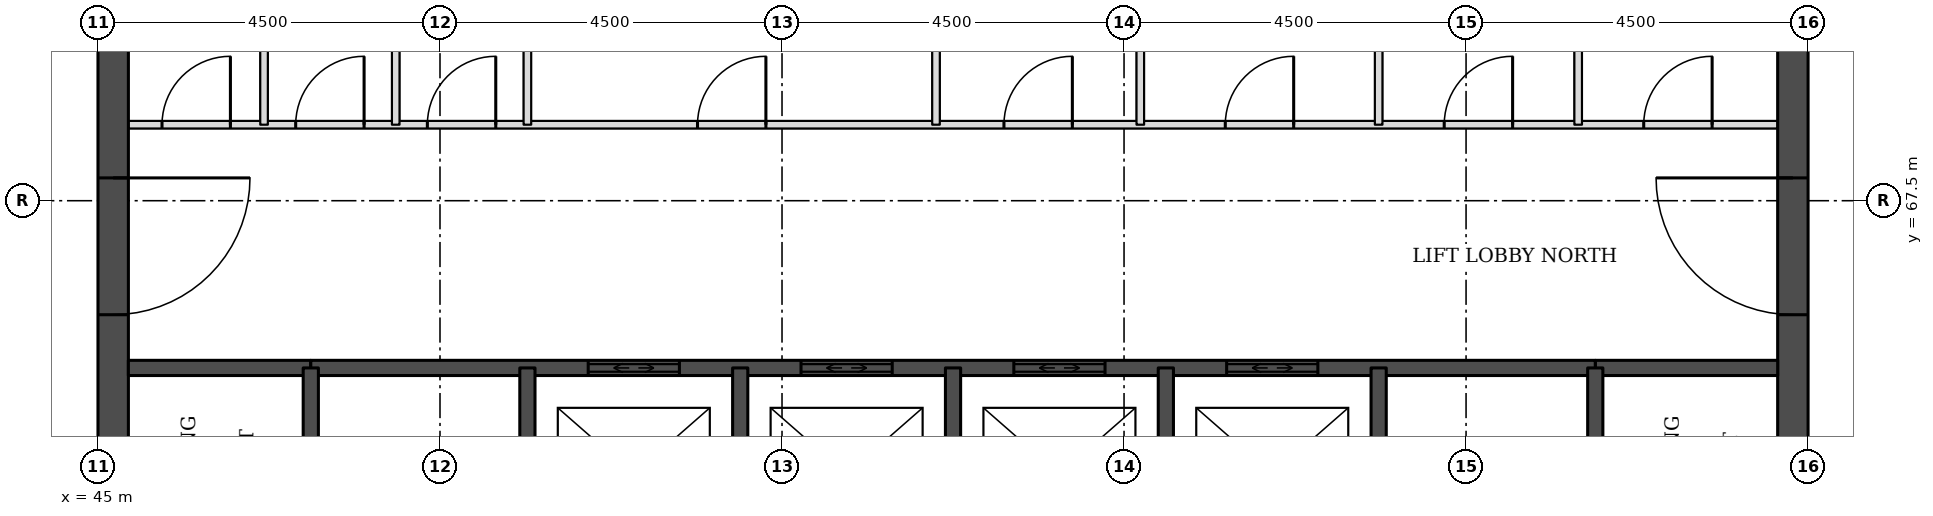
"""IFC4 building model, lengths in metres.
Left out: names, types, materials, properties, quantities, classifications, styles, units other than length and angle.
Written with IfcOpenShell. Run it as: python <this file> out.ifc"""

import sys

from ifc_helpers import new_model, si_unit, direction, frame, frame_2d, origin, place, context, subcontext, project, spatial, rectangle, extrude, element, fill, save


model = new_model("IFC4")
c1 = context("Model", 3, precision=1e-05, world=origin(), true_north=direction((0.0, 1.0)))
c2 = subcontext(c1, "Body", "Model", "MODEL_VIEW")
j1 = project(units=[si_unit("LENGTHUNIT", "METRE"), si_unit("PLANEANGLEUNIT", "RADIAN")], contexts=[c1])
p1 = place(None, origin())
s1 = spatial("IfcSite", under=j1, at=p1, CompositionType="ELEMENT")
p2 = place(p1, origin())
s2 = spatial("IfcBuilding", under=s1, at=p2, CompositionType="ELEMENT")
p3 = place(p2, frame((0.0, 0.0, 184.7)))
s3 = spatial("IfcBuildingStorey", under=s2, at=p3, CompositionType="ELEMENT", Elevation=184.7)
p4 = place(p3, frame((45.2, 49.5, 0.0), z_axis=(0.0, 0.0, 1.0), x_axis=(0.0, 1.0, 0.0)))
e1 = element("IfcWall", 1, at=p4, inside=s3, PredefinedType="SHEAR", context=c2, shape_type="SweptSolid", body=[
    extrude(rectangle(XDim=22.5, YDim=0.4, at=frame_2d((11.25, 0.0))), origin(), (0.0, 0.0, 1.0), 3.7),
])
p5 = place(p4, frame((4.2, 0.0, 0.0)))
e2 = element("IfcOpeningElement", 2, at=p5, cuts=e1, PredefinedType="OPENING", context=c2, shape_type="SweptSolid", body=[
    extrude(rectangle(XDim=1.8, YDim=2.1, at=frame_2d((0.9, 1.05))), frame((0.0, 0.21, 0.0), z_axis=(0.0, -1.0, 0.0), x_axis=(1.0, 0.0, 0.0)), (0.0, 0.0, 1.0), 0.42),
])
p6 = place(p4, frame((6.9, 0.0, 0.0)))
e3 = element("IfcOpeningElement", 3, at=p6, cuts=e1, PredefinedType="OPENING", context=c2, shape_type="SweptSolid", body=[
    extrude(rectangle(XDim=1.1, YDim=2.1, at=frame_2d((0.55, 1.05))), frame((0.0, 0.21, 0.0), z_axis=(0.0, -1.0, 0.0), x_axis=(1.0, 0.0, 0.0)), (0.0, 0.0, 1.0), 0.42),
])
p7 = place(p4, frame((13.6, 0.0, 0.0)))
e4 = element("IfcOpeningElement", 4, at=p7, cuts=e1, PredefinedType="OPENING", context=c2, shape_type="SweptSolid", body=[
    extrude(rectangle(XDim=1.1, YDim=2.1, at=frame_2d((0.55, 1.05))), frame((0.0, 0.21, 0.0), z_axis=(0.0, -1.0, 0.0), x_axis=(1.0, 0.0, 0.0)), (0.0, 0.0, 1.0), 0.42),
])
p8 = place(p4, frame((16.5, 0.0, 0.0)))
e5 = element("IfcOpeningElement", 5, at=p8, cuts=e1, PredefinedType="OPENING", context=c2, shape_type="SweptSolid", body=[
    extrude(rectangle(XDim=1.8, YDim=2.1, at=frame_2d((0.9, 1.05))), frame((0.0, 0.21, 0.0), z_axis=(0.0, -1.0, 0.0), x_axis=(1.0, 0.0, 0.0)), (0.0, 0.0, 1.0), 0.42),
])
p9 = place(p3, frame((67.3, 49.5, 0.0), z_axis=(0.0, 0.0, 1.0), x_axis=(0.0, 1.0, 0.0)))
e6 = element("IfcWall", 6, at=p9, inside=s3, PredefinedType="SHEAR", context=c2, shape_type="SweptSolid", body=[
    extrude(rectangle(XDim=22.5, YDim=0.4, at=frame_2d((11.25, 0.0))), origin(), (0.0, 0.0, 1.0), 3.7),
])
p10 = place(p9, frame((4.2, 0.0, 0.0)))
e7 = element("IfcOpeningElement", 7, at=p10, cuts=e6, PredefinedType="OPENING", context=c2, shape_type="SweptSolid", body=[
    extrude(rectangle(XDim=1.8, YDim=2.1, at=frame_2d((0.9, 1.05))), frame((0.0, 0.21, 0.0), z_axis=(0.0, -1.0, 0.0), x_axis=(1.0, 0.0, 0.0)), (0.0, 0.0, 1.0), 0.42),
])
p11 = place(p9, frame((6.9, 0.0, 0.0)))
e8 = element("IfcOpeningElement", 8, at=p11, cuts=e6, PredefinedType="OPENING", context=c2, shape_type="SweptSolid", body=[
    extrude(rectangle(XDim=1.1, YDim=2.1, at=frame_2d((0.55, 1.05))), frame((0.0, 0.21, 0.0), z_axis=(0.0, -1.0, 0.0), x_axis=(1.0, 0.0, 0.0)), (0.0, 0.0, 1.0), 0.42),
])
p12 = place(p9, frame((13.6, 0.0, 0.0)))
e9 = element("IfcOpeningElement", 9, at=p12, cuts=e6, PredefinedType="OPENING", context=c2, shape_type="SweptSolid", body=[
    extrude(rectangle(XDim=1.1, YDim=2.1, at=frame_2d((0.55, 1.05))), frame((0.0, 0.21, 0.0), z_axis=(0.0, -1.0, 0.0), x_axis=(1.0, 0.0, 0.0)), (0.0, 0.0, 1.0), 0.42),
])
p13 = place(p9, frame((16.5, 0.0, 0.0)))
e10 = element("IfcOpeningElement", 10, at=p13, cuts=e6, PredefinedType="OPENING", context=c2, shape_type="SweptSolid", body=[
    extrude(rectangle(XDim=1.8, YDim=2.1, at=frame_2d((0.9, 1.05))), frame((0.0, 0.21, 0.0), z_axis=(0.0, -1.0, 0.0), x_axis=(1.0, 0.0, 0.0)), (0.0, 0.0, 1.0), 0.42),
])
for number, where, z_axis, x_axis in (
    (11, (45.4, 65.3, 0.0), (0.0, 0.0, 1.0), (1.0, 0.0, 0.0)),
    (12, (64.7, 65.3, 0.0), (0.0, 0.0, 1.0), (1.0, 0.0, 0.0)),
):
    element("IfcWall", number, at=place(p3, frame(where, z_axis=z_axis, x_axis=x_axis)), inside=s3, PredefinedType="SOLIDWALL", context=c2, shape_type="SweptSolid", body=[
        extrude(rectangle(XDim=2.4, YDim=0.2, at=frame_2d((1.2, 0.0))), origin(), (0.0, 0.0, 1.0), 3.55),
    ])
p14 = place(p3, frame((47.8, 65.3, 0.0), z_axis=(0.0, 0.0, 1.0), x_axis=(1.0, 0.0, 0.0)))
e13 = element("IfcWall", 13, at=p14, inside=s3, PredefinedType="SOLIDWALL", context=c2, shape_type="SweptSolid", body=[
    extrude(rectangle(XDim=16.9, YDim=0.2, at=frame_2d((8.45, 0.0))), origin(), (0.0, 0.0, 1.0), 3.55),
])
p15 = place(p14, frame((3.65, 0.0, 0.0)))
e14 = element("IfcOpeningElement", 14, at=p15, cuts=e13, PredefinedType="OPENING", context=c2, shape_type="SweptSolid", body=[
    extrude(rectangle(XDim=1.2, YDim=2.1, at=frame_2d((0.6, 1.05))), frame((0.0, 0.11, 0.0), z_axis=(0.0, -1.0, 0.0), x_axis=(1.0, 0.0, 0.0)), (0.0, 0.0, 1.0), 0.22),
])
p16 = place(p14, frame((6.45, 0.0, 0.0)))
e15 = element("IfcOpeningElement", 15, at=p16, cuts=e13, PredefinedType="OPENING", context=c2, shape_type="SweptSolid", body=[
    extrude(rectangle(XDim=1.2, YDim=2.1, at=frame_2d((0.6, 1.05))), frame((0.0, 0.11, 0.0), z_axis=(0.0, -1.0, 0.0), x_axis=(1.0, 0.0, 0.0)), (0.0, 0.0, 1.0), 0.22),
])
p17 = place(p14, frame((9.25, 0.0, 0.0)))
e16 = element("IfcOpeningElement", 16, at=p17, cuts=e13, PredefinedType="OPENING", context=c2, shape_type="SweptSolid", body=[
    extrude(rectangle(XDim=1.2, YDim=2.1, at=frame_2d((0.6, 1.05))), frame((0.0, 0.11, 0.0), z_axis=(0.0, -1.0, 0.0), x_axis=(1.0, 0.0, 0.0)), (0.0, 0.0, 1.0), 0.22),
])
p18 = place(p14, frame((12.05, 0.0, 0.0)))
e17 = element("IfcOpeningElement", 17, at=p18, cuts=e13, PredefinedType="OPENING", context=c2, shape_type="SweptSolid", body=[
    extrude(rectangle(XDim=1.2, YDim=2.1, at=frame_2d((0.6, 1.05))), frame((0.0, 0.11, 0.0), z_axis=(0.0, -1.0, 0.0), x_axis=(1.0, 0.0, 0.0)), (0.0, 0.0, 1.0), 0.22),
])
p19 = place(p3, frame((45.4, 68.5, 0.0), z_axis=(0.0, 0.0, 1.0), x_axis=(1.0, 0.0, 0.0)))
e18 = element("IfcWall", 18, at=p19, inside=s3, PredefinedType="PARTITIONING", context=c2, shape_type="SweptSolid", body=[
    extrude(rectangle(XDim=21.7, YDim=0.1, at=frame_2d((10.85, 0.0))), origin(), (0.0, 0.0, 1.0), 3.55),
])
p20 = place(p19, frame((19.938, 0.0, 0.0)))
e19 = element("IfcOpeningElement", 19, at=p20, cuts=e18, PredefinedType="OPENING", context=c2, shape_type="SweptSolid", body=[
    extrude(rectangle(XDim=0.9, YDim=2.1, at=frame_2d((0.45, 1.05))), frame((0.0, 0.06, 0.0), z_axis=(0.0, -1.0, 0.0), x_axis=(1.0, 0.0, 0.0)), (0.0, 0.0, 1.0), 0.12),
])
p21 = place(p19, frame((17.312, 0.0, 0.0)))
e20 = element("IfcOpeningElement", 20, at=p21, cuts=e18, PredefinedType="OPENING", context=c2, shape_type="SweptSolid", body=[
    extrude(rectangle(XDim=0.9, YDim=2.1, at=frame_2d((0.45, 1.05))), frame((0.0, 0.06, 0.0), z_axis=(0.0, -1.0, 0.0), x_axis=(1.0, 0.0, 0.0)), (0.0, 0.0, 1.0), 0.12),
])
p22 = place(p19, frame((0.442, 0.0, 0.0)))
e21 = element("IfcOpeningElement", 21, at=p22, cuts=e18, PredefinedType="OPENING", context=c2, shape_type="SweptSolid", body=[
    extrude(rectangle(XDim=0.9, YDim=2.1, at=frame_2d((0.45, 1.05))), frame((0.0, 0.06, 0.0), z_axis=(0.0, -1.0, 0.0), x_axis=(1.0, 0.0, 0.0)), (0.0, 0.0, 1.0), 0.12),
])
p23 = place(p19, frame((2.201, 0.0, 0.0)))
e22 = element("IfcOpeningElement", 22, at=p23, cuts=e18, PredefinedType="OPENING", context=c2, shape_type="SweptSolid", body=[
    extrude(rectangle(XDim=0.9, YDim=2.1, at=frame_2d((0.45, 1.05))), frame((0.0, 0.06, 0.0), z_axis=(0.0, -1.0, 0.0), x_axis=(1.0, 0.0, 0.0)), (0.0, 0.0, 1.0), 0.12),
])
p24 = place(p19, frame((3.934, 0.0, 0.0)))
e23 = element("IfcOpeningElement", 23, at=p24, cuts=e18, PredefinedType="OPENING", context=c2, shape_type="SweptSolid", body=[
    extrude(rectangle(XDim=0.9, YDim=2.1, at=frame_2d((0.45, 1.05))), frame((0.0, 0.06, 0.0), z_axis=(0.0, -1.0, 0.0), x_axis=(1.0, 0.0, 0.0)), (0.0, 0.0, 1.0), 0.12),
])
p25 = place(p19, frame((14.432, 0.0, 0.0)))
e24 = element("IfcOpeningElement", 24, at=p25, cuts=e18, PredefinedType="OPENING", context=c2, shape_type="SweptSolid", body=[
    extrude(rectangle(XDim=0.9, YDim=2.1, at=frame_2d((0.45, 1.05))), frame((0.0, 0.06, 0.0), z_axis=(0.0, -1.0, 0.0), x_axis=(1.0, 0.0, 0.0)), (0.0, 0.0, 1.0), 0.12),
])
p26 = place(p19, frame((11.52, 0.0, 0.0)))
e25 = element("IfcOpeningElement", 25, at=p26, cuts=e18, PredefinedType="OPENING", context=c2, shape_type="SweptSolid", body=[
    extrude(rectangle(XDim=0.9, YDim=2.1, at=frame_2d((0.45, 1.05))), frame((0.0, 0.06, 0.0), z_axis=(0.0, -1.0, 0.0), x_axis=(1.0, 0.0, 0.0)), (0.0, 0.0, 1.0), 0.12),
])
p27 = place(p19, frame((7.488, 0.0, 0.0)))
e26 = element("IfcOpeningElement", 26, at=p27, cuts=e18, PredefinedType="OPENING", context=c2, shape_type="SweptSolid", body=[
    extrude(rectangle(XDim=0.9, YDim=2.1, at=frame_2d((0.45, 1.05))), frame((0.0, 0.06, 0.0), z_axis=(0.0, -1.0, 0.0), x_axis=(1.0, 0.0, 0.0)), (0.0, 0.0, 1.0), 0.12),
])
p28 = place(p3, frame((47.185, 68.5, 0.0), z_axis=(0.0, 0.0, 1.0), x_axis=(0.0, 1.0, 0.0)))
e27 = element("IfcWall", 27, at=p28, inside=s3, PredefinedType="PARTITIONING", context=c2, shape_type="SweptSolid", body=[
    extrude(rectangle(XDim=3.1, YDim=0.1, at=frame_2d((1.55, 0.0))), origin(), (0.0, 0.0, 1.0), 3.55),
])
p29 = place(p3, frame((47.8, 62.0, 0.0), z_axis=(0.0, 0.0, 1.0), x_axis=(0.0, 1.0, 0.0)))
e28 = element("IfcWall", 28, at=p29, inside=s3, PredefinedType="SOLIDWALL", context=c2, shape_type="SweptSolid", body=[
    extrude(rectangle(XDim=3.3, YDim=0.2, at=frame_2d((1.65, 0.0))), origin(), (0.0, 0.0, 1.0), 3.55),
])
p30 = place(p29, frame((1.1, 0.0, 0.0)))
e29 = element("IfcOpeningElement", 29, at=p30, cuts=e28, PredefinedType="OPENING", context=c2, shape_type="SweptSolid", body=[
    extrude(rectangle(XDim=1.1, YDim=2.1, at=frame_2d((0.55, 1.05))), frame((0.0, 0.11, 0.0), z_axis=(0.0, -1.0, 0.0), x_axis=(1.0, 0.0, 0.0)), (0.0, 0.0, 1.0), 0.22),
])
for number, where, z_axis, x_axis in (
    (30, (48.917, 68.5, 0.0), (0.0, 0.0, 1.0), (0.0, 1.0, 0.0)),
    (31, (50.65, 68.5, 0.0), (0.0, 0.0, 1.0), (0.0, 1.0, 0.0)),
):
    element("IfcWall", number, at=place(p3, frame(where, z_axis=z_axis, x_axis=x_axis)), inside=s3, PredefinedType="PARTITIONING", context=c2, shape_type="SweptSolid", body=[
        extrude(rectangle(XDim=3.1, YDim=0.1, at=frame_2d((1.55, 0.0))), origin(), (0.0, 0.0, 1.0), 3.55),
    ])
p31 = place(p3, frame((50.65, 62.0, 0.0), z_axis=(0.0, 0.0, 1.0), x_axis=(0.0, 1.0, 0.0)))
e32 = element("IfcWall", 32, at=p31, inside=s3, PredefinedType="SOLIDWALL", context=c2, shape_type="SweptSolid", body=[
    extrude(rectangle(XDim=3.3, YDim=0.2, at=frame_2d((1.65, 0.0))), origin(), (0.0, 0.0, 1.0), 3.55),
])
p32 = place(p3, frame((53.45, 62.5, 0.0), z_axis=(0.0, 0.0, 1.0), x_axis=(0.0, 1.0, 0.0)))
e33 = element("IfcWall", 33, at=p32, inside=s3, PredefinedType="SOLIDWALL", context=c2, shape_type="SweptSolid", body=[
    extrude(rectangle(XDim=2.8, YDim=0.2, at=frame_2d((1.4, 0.0))), origin(), (0.0, 0.0, 1.0), 3.55),
])
p33 = place(p3, frame((56.026, 68.5, 0.0), z_axis=(0.0, 0.0, 1.0), x_axis=(0.0, 1.0, 0.0)))
e34 = element("IfcWall", 34, at=p33, inside=s3, PredefinedType="PARTITIONING", context=c2, shape_type="SweptSolid", body=[
    extrude(rectangle(XDim=3.1, YDim=0.1, at=frame_2d((1.55, 0.0))), origin(), (0.0, 0.0, 1.0), 3.55),
])
p34 = place(p3, frame((56.25, 62.5, 0.0), z_axis=(0.0, 0.0, 1.0), x_axis=(0.0, 1.0, 0.0)))
e35 = element("IfcWall", 35, at=p34, inside=s3, PredefinedType="SOLIDWALL", context=c2, shape_type="SweptSolid", body=[
    extrude(rectangle(XDim=2.8, YDim=0.2, at=frame_2d((1.4, 0.0))), origin(), (0.0, 0.0, 1.0), 3.55),
])
p35 = place(p3, frame((58.714, 68.5, 0.0), z_axis=(0.0, 0.0, 1.0), x_axis=(0.0, 1.0, 0.0)))
e36 = element("IfcWall", 36, at=p35, inside=s3, PredefinedType="PARTITIONING", context=c2, shape_type="SweptSolid", body=[
    extrude(rectangle(XDim=3.1, YDim=0.1, at=frame_2d((1.55, 0.0))), origin(), (0.0, 0.0, 1.0), 3.55),
])
p36 = place(p3, frame((59.05, 62.5, 0.0), z_axis=(0.0, 0.0, 1.0), x_axis=(0.0, 1.0, 0.0)))
e37 = element("IfcWall", 37, at=p36, inside=s3, PredefinedType="SOLIDWALL", context=c2, shape_type="SweptSolid", body=[
    extrude(rectangle(XDim=2.8, YDim=0.2, at=frame_2d((1.4, 0.0))), origin(), (0.0, 0.0, 1.0), 3.55),
])
p37 = place(p3, frame((61.85, 68.5, 0.0), z_axis=(0.0, 0.0, 1.0), x_axis=(0.0, 1.0, 0.0)))
e38 = element("IfcWall", 38, at=p37, inside=s3, PredefinedType="PARTITIONING", context=c2, shape_type="SweptSolid", body=[
    extrude(rectangle(XDim=3.1, YDim=0.1, at=frame_2d((1.55, 0.0))), origin(), (0.0, 0.0, 1.0), 3.55),
])
p38 = place(p3, frame((61.85, 62.0, 0.0), z_axis=(0.0, 0.0, 1.0), x_axis=(0.0, 1.0, 0.0)))
e39 = element("IfcWall", 39, at=p38, inside=s3, PredefinedType="SOLIDWALL", context=c2, shape_type="SweptSolid", body=[
    extrude(rectangle(XDim=3.3, YDim=0.2, at=frame_2d((1.65, 0.0))), origin(), (0.0, 0.0, 1.0), 3.55),
])
p39 = place(p3, frame((64.475, 68.5, 0.0), z_axis=(0.0, 0.0, 1.0), x_axis=(0.0, 1.0, 0.0)))
e40 = element("IfcWall", 40, at=p39, inside=s3, PredefinedType="PARTITIONING", context=c2, shape_type="SweptSolid", body=[
    extrude(rectangle(XDim=3.1, YDim=0.1, at=frame_2d((1.55, 0.0))), origin(), (0.0, 0.0, 1.0), 3.55),
])
p40 = place(p3, frame((64.7, 62.0, 0.0), z_axis=(0.0, 0.0, 1.0), x_axis=(0.0, 1.0, 0.0)))
e41 = element("IfcWall", 41, at=p40, inside=s3, PredefinedType="SOLIDWALL", context=c2, shape_type="SweptSolid", body=[
    extrude(rectangle(XDim=3.3, YDim=0.2, at=frame_2d((1.65, 0.0))), origin(), (0.0, 0.0, 1.0), 3.55),
])
p41 = place(p40, frame((1.1, 0.0, 0.0)))
e42 = element("IfcOpeningElement", 42, at=p41, cuts=e41, PredefinedType="OPENING", context=c2, shape_type="SweptSolid", body=[
    extrude(rectangle(XDim=1.1, YDim=2.1, at=frame_2d((0.55, 1.05))), frame((0.0, 0.11, 0.0), z_axis=(0.0, -1.0, 0.0), x_axis=(1.0, 0.0, 0.0)), (0.0, 0.0, 1.0), 0.22),
])
p42 = place(p15, origin())
e43 = element("IfcDoor", 43, at=p42, inside=s3, OperationType="DOUBLE_DOOR_SLIDING", PredefinedType="DOOR", context=c2, shape_type="SweptSolid", body=[
    extrude(rectangle(XDim=1.2, YDim=2.1, at=frame_2d((0.6, 1.05))), frame((0.0, 0.025, 0.0), z_axis=(0.0, -1.0, 0.0), x_axis=(1.0, 0.0, 0.0)), (0.0, 0.0, 1.0), 0.05),
])
fill(e14, e43)
p43 = place(p16, origin())
e44 = element("IfcDoor", 44, at=p43, inside=s3, OperationType="DOUBLE_DOOR_SLIDING", PredefinedType="DOOR", context=c2, shape_type="SweptSolid", body=[
    extrude(rectangle(XDim=1.2, YDim=2.1, at=frame_2d((0.6, 1.05))), frame((0.0, 0.025, 0.0), z_axis=(0.0, -1.0, 0.0), x_axis=(1.0, 0.0, 0.0)), (0.0, 0.0, 1.0), 0.05),
])
fill(e15, e44)
p44 = place(p17, origin())
e45 = element("IfcDoor", 45, at=p44, inside=s3, OperationType="DOUBLE_DOOR_SLIDING", PredefinedType="DOOR", context=c2, shape_type="SweptSolid", body=[
    extrude(rectangle(XDim=1.2, YDim=2.1, at=frame_2d((0.6, 1.05))), frame((0.0, 0.025, 0.0), z_axis=(0.0, -1.0, 0.0), x_axis=(1.0, 0.0, 0.0)), (0.0, 0.0, 1.0), 0.05),
])
fill(e16, e45)
p45 = place(p18, origin())
e46 = element("IfcDoor", 46, at=p45, inside=s3, OperationType="DOUBLE_DOOR_SLIDING", PredefinedType="DOOR", context=c2, shape_type="SweptSolid", body=[
    extrude(rectangle(XDim=1.2, YDim=2.1, at=frame_2d((0.6, 1.05))), frame((0.0, 0.025, 0.0), z_axis=(0.0, -1.0, 0.0), x_axis=(1.0, 0.0, 0.0)), (0.0, 0.0, 1.0), 0.05),
])
fill(e17, e46)
p46 = place(p8, frame((1.8, 0.0, 0.0), z_axis=(0.0, 0.0, 1.0), x_axis=(-1.0, 0.0, 0.0)))
e47 = element("IfcDoor", 47, at=p46, inside=s3, OperationType="SINGLE_SWING_LEFT", PredefinedType="DOOR", context=c2, shape_type="SweptSolid", body=[
    extrude(rectangle(XDim=1.8, YDim=2.1, at=frame_2d((0.9, 1.05))), frame((0.0, 0.025, 0.0), z_axis=(0.0, -1.0, 0.0), x_axis=(1.0, 0.0, 0.0)), (0.0, 0.0, 1.0), 0.05),
])
fill(e5, e47)
p47 = place(p13, origin())
e48 = element("IfcDoor", 48, at=p47, inside=s3, OperationType="SINGLE_SWING_RIGHT", PredefinedType="DOOR", context=c2, shape_type="SweptSolid", body=[
    extrude(rectangle(XDim=1.8, YDim=2.1, at=frame_2d((0.9, 1.05))), frame((0.0, 0.025, 0.0), z_axis=(0.0, -1.0, 0.0), x_axis=(1.0, 0.0, 0.0)), (0.0, 0.0, 1.0), 0.05),
])
fill(e10, e48)
p48 = place(p20, origin())
e49 = element("IfcDoor", 49, at=p48, inside=s3, OperationType="SINGLE_SWING_RIGHT", PredefinedType="DOOR", context=c2, shape_type="SweptSolid", body=[
    extrude(rectangle(XDim=0.9, YDim=2.1, at=frame_2d((0.45, 1.05))), frame((0.0, 0.025, 0.0), z_axis=(0.0, -1.0, 0.0), x_axis=(1.0, 0.0, 0.0)), (0.0, 0.0, 1.0), 0.05),
])
fill(e19, e49)
p49 = place(p21, origin())
e50 = element("IfcDoor", 50, at=p49, inside=s3, OperationType="SINGLE_SWING_RIGHT", PredefinedType="DOOR", context=c2, shape_type="SweptSolid", body=[
    extrude(rectangle(XDim=0.9, YDim=2.1, at=frame_2d((0.45, 1.05))), frame((0.0, 0.025, 0.0), z_axis=(0.0, -1.0, 0.0), x_axis=(1.0, 0.0, 0.0)), (0.0, 0.0, 1.0), 0.05),
])
fill(e20, e50)
p50 = place(p22, origin())
e51 = element("IfcDoor", 51, at=p50, inside=s3, OperationType="SINGLE_SWING_RIGHT", PredefinedType="DOOR", context=c2, shape_type="SweptSolid", body=[
    extrude(rectangle(XDim=0.9, YDim=2.1, at=frame_2d((0.45, 1.05))), frame((0.0, 0.025, 0.0), z_axis=(0.0, -1.0, 0.0), x_axis=(1.0, 0.0, 0.0)), (0.0, 0.0, 1.0), 0.05),
])
fill(e21, e51)
p51 = place(p23, origin())
e52 = element("IfcDoor", 52, at=p51, inside=s3, OperationType="SINGLE_SWING_RIGHT", PredefinedType="DOOR", context=c2, shape_type="SweptSolid", body=[
    extrude(rectangle(XDim=0.9, YDim=2.1, at=frame_2d((0.45, 1.05))), frame((0.0, 0.025, 0.0), z_axis=(0.0, -1.0, 0.0), x_axis=(1.0, 0.0, 0.0)), (0.0, 0.0, 1.0), 0.05),
])
fill(e22, e52)
p52 = place(p24, origin())
e53 = element("IfcDoor", 53, at=p52, inside=s3, OperationType="SINGLE_SWING_RIGHT", PredefinedType="DOOR", context=c2, shape_type="SweptSolid", body=[
    extrude(rectangle(XDim=0.9, YDim=2.1, at=frame_2d((0.45, 1.05))), frame((0.0, 0.025, 0.0), z_axis=(0.0, -1.0, 0.0), x_axis=(1.0, 0.0, 0.0)), (0.0, 0.0, 1.0), 0.05),
])
fill(e23, e53)
p53 = place(p25, origin())
e54 = element("IfcDoor", 54, at=p53, inside=s3, OperationType="SINGLE_SWING_RIGHT", PredefinedType="DOOR", context=c2, shape_type="SweptSolid", body=[
    extrude(rectangle(XDim=0.9, YDim=2.1, at=frame_2d((0.45, 1.05))), frame((0.0, 0.025, 0.0), z_axis=(0.0, -1.0, 0.0), x_axis=(1.0, 0.0, 0.0)), (0.0, 0.0, 1.0), 0.05),
])
fill(e24, e54)
p54 = place(p26, origin())
e55 = element("IfcDoor", 55, at=p54, inside=s3, OperationType="SINGLE_SWING_RIGHT", PredefinedType="DOOR", context=c2, shape_type="SweptSolid", body=[
    extrude(rectangle(XDim=0.9, YDim=2.1, at=frame_2d((0.45, 1.05))), frame((0.0, 0.025, 0.0), z_axis=(0.0, -1.0, 0.0), x_axis=(1.0, 0.0, 0.0)), (0.0, 0.0, 1.0), 0.05),
])
fill(e25, e55)
p55 = place(p27, origin())
e56 = element("IfcDoor", 56, at=p55, inside=s3, OperationType="SINGLE_SWING_RIGHT", PredefinedType="DOOR", context=c2, shape_type="SweptSolid", body=[
    extrude(rectangle(XDim=0.9, YDim=2.1, at=frame_2d((0.45, 1.05))), frame((0.0, 0.025, 0.0), z_axis=(0.0, -1.0, 0.0), x_axis=(1.0, 0.0, 0.0)), (0.0, 0.0, 1.0), 0.05),
])
fill(e26, e56)
save(model, sys.argv[1])
